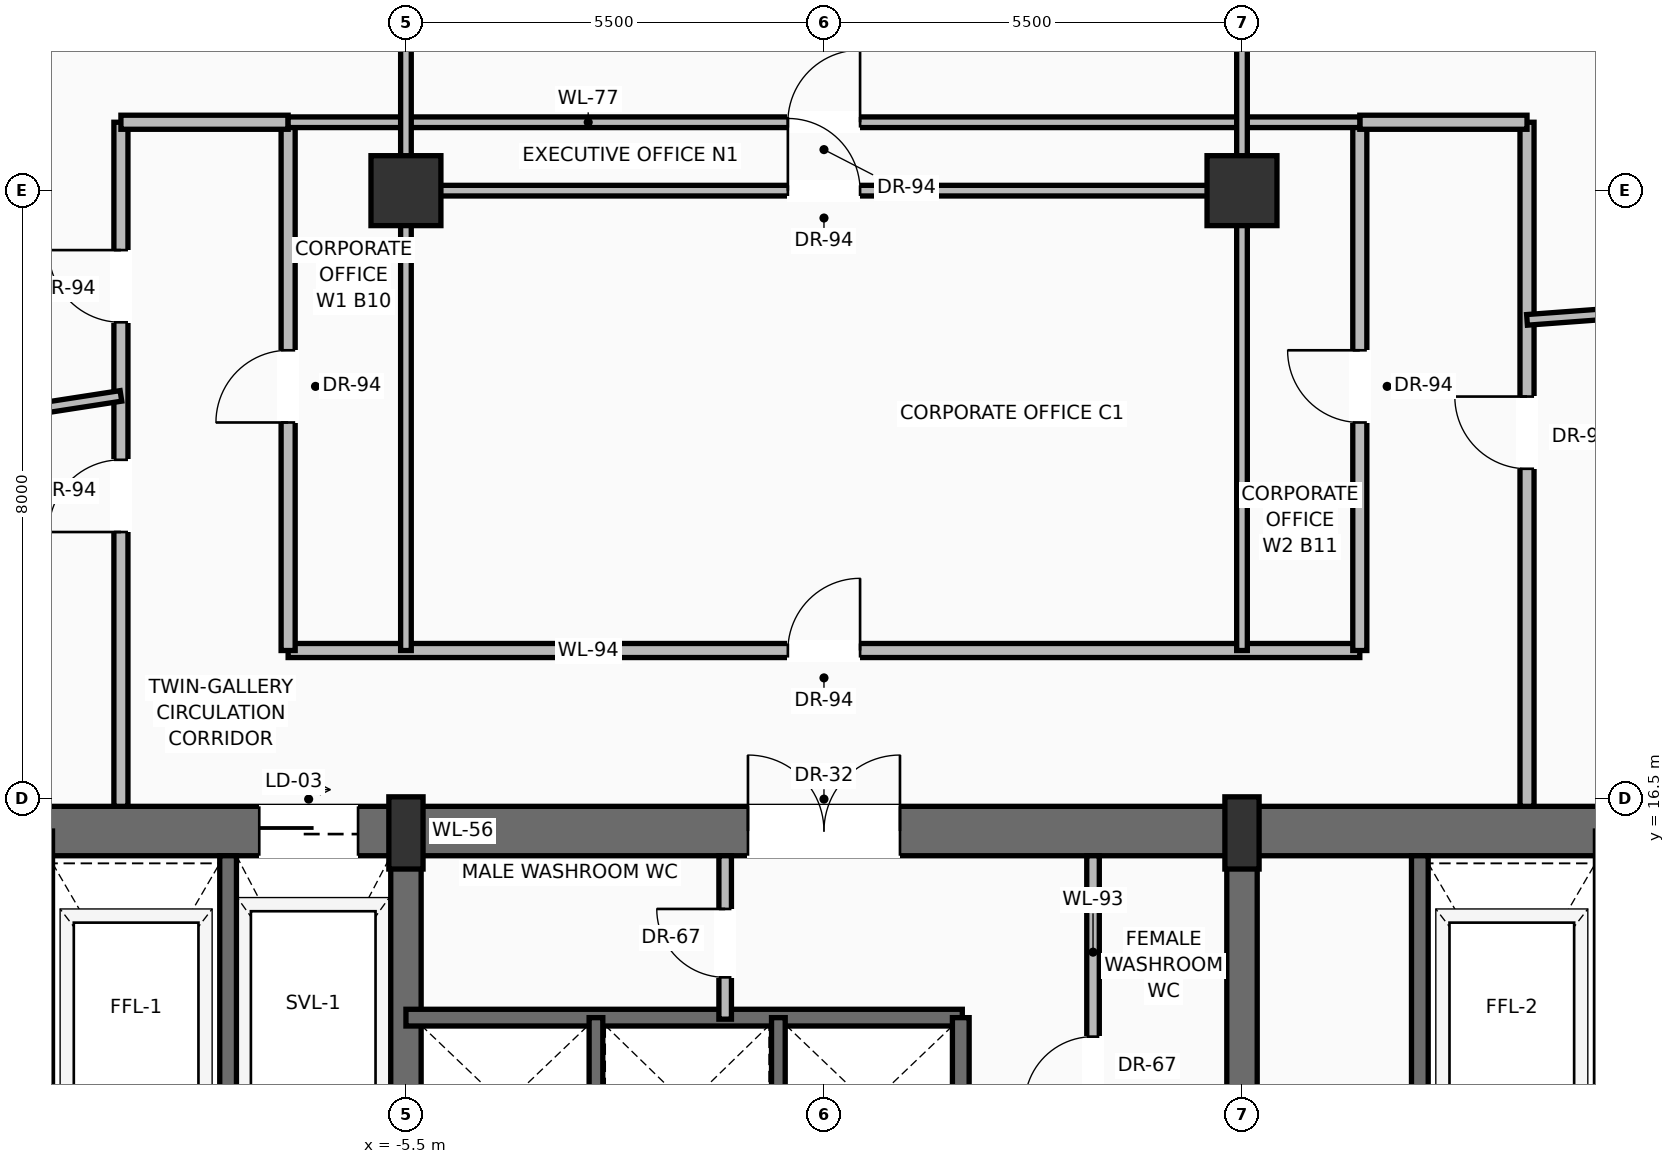
"""IFC4 building model, lengths in metres.
Left out: names, types, materials, properties, quantities, classifications, styles, units other than length and angle.
Written with IfcOpenShell. Run it as: python <this file> out.ifc"""

import sys

from ifc_helpers import new_model, si_unit, direction, frame, frame_2d, origin, origin_2d, place, context, subcontext, project, spatial, rectangle, extrude, source, transform, mapped, element, fill, save


model = new_model("IFC4")
c1 = context("Model", 3, precision=1e-05, world=origin(), true_north=direction((0.0, 1.0)))
c2 = subcontext(c1, "Body", "Model", "MODEL_VIEW")
j1 = project(units=[si_unit("LENGTHUNIT", "METRE"), si_unit("PLANEANGLEUNIT", "RADIAN")], contexts=[c1])
p1 = place(None, origin())
s1 = spatial("IfcSite", under=j1, at=p1, CompositionType="ELEMENT")
p2 = place(p1, origin())
s2 = spatial("IfcBuilding", under=s1, at=p2, CompositionType="ELEMENT")
p3 = place(p2, frame((0.0, 0.0, 129.3)))
s3 = spatial("IfcBuildingStorey", under=s2, at=p3, CompositionType="ELEMENT", Elevation=129.3)
p4 = place(p3, frame((-10.8, 16.075, 0.0), z_axis=(0.0, 0.0, 1.0), x_axis=(1.0, 0.0, 0.0)))
e1 = element("IfcWall", 1, at=p4, inside=s3, PredefinedType="SHEAR", context=c2, shape_type="SweptSolid", body=[
    extrude(rectangle(XDim=21.6, YDim=0.65, at=frame_2d((10.8, 0.0))), origin(), (0.0, 0.0, 1.0), 3.47),
])
p5 = place(p4, frame((3.37, 0.0, 0.0)))
e2 = element("IfcOpeningElement", 2, at=p5, cuts=e1, PredefinedType="OPENING", context=c2, shape_type="SweptSolid", body=[
    extrude(rectangle(XDim=1.3, YDim=2.3, at=frame_2d((0.65, 1.15))), frame((0.0, 0.335, 0.0), z_axis=(0.0, -1.0, 0.0), x_axis=(1.0, 0.0, 0.0)), (0.0, 0.0, 1.0), 0.67),
])
p6 = place(p4, frame((9.8, 0.0, 0.0)))
e3 = element("IfcOpeningElement", 3, at=p6, cuts=e1, PredefinedType="OPENING", context=c2, shape_type="SweptSolid", body=[
    extrude(rectangle(XDim=2.0, YDim=2.4, at=frame_2d((1.0, 1.2))), frame((0.0, 0.335, 0.0), z_axis=(0.0, -1.0, 0.0), x_axis=(1.0, 0.0, 0.0)), (0.0, 0.0, 1.0), 0.67),
])
for number, where, z_axis, x_axis in (
    (4, (-10.475, 0.525, 0.0), (0.0, 0.0, 1.0), (0.0, 1.0, 0.0)),
    (5, (10.475, 0.525, 0.0), (0.0, 0.0, 1.0), (0.0, 1.0, 0.0)),
):
    element("IfcWall", number, at=place(p3, frame(where, z_axis=z_axis, x_axis=x_axis)), inside=s3, PredefinedType="SHEAR", context=c2, shape_type="SweptSolid", body=[
        extrude(rectangle(XDim=15.55, YDim=0.65, at=frame_2d((7.775, 0.0))), origin(), (0.0, 0.0, 1.0), 3.47),
    ])
p7 = place(p3, frame((-5.5, 0.525, 0.0), z_axis=(0.0, 0.0, 1.0), x_axis=(0.0, 1.0, 0.0)))
e6 = element("IfcWall", 6, at=p7, inside=s3, PredefinedType="SHEAR", context=c2, shape_type="SweptSolid", body=[
    extrude(rectangle(XDim=15.55, YDim=0.4, at=frame_2d((7.775, 0.0))), origin(), (0.0, 0.0, 1.0), 3.47),
])
p8 = place(p7, frame((8.975, 0.0, 0.0)))
e7 = element("IfcOpeningElement", 7, at=p8, cuts=e6, PredefinedType="OPENING", context=c2, shape_type="SweptSolid", body=[
    extrude(rectangle(XDim=1.1, YDim=2.2, at=frame_2d((0.55, 1.1))), frame((0.0, 0.21, 0.0), z_axis=(0.0, -1.0, 0.0), x_axis=(1.0, 0.0, 0.0)), (0.0, 0.0, 1.0), 0.42),
])
p9 = place(p3, frame((5.5, 0.525, 0.0), z_axis=(0.0, 0.0, 1.0), x_axis=(0.0, 1.0, 0.0)))
e8 = element("IfcWall", 8, at=p9, inside=s3, PredefinedType="SHEAR", context=c2, shape_type="SweptSolid", body=[
    extrude(rectangle(XDim=15.55, YDim=0.4, at=frame_2d((7.775, 0.0))), origin(), (0.0, 0.0, 1.0), 3.47),
])
p10 = place(p9, frame((8.975, 0.0, 0.0)))
e9 = element("IfcOpeningElement", 9, at=p10, cuts=e8, PredefinedType="OPENING", context=c2, shape_type="SweptSolid", body=[
    extrude(rectangle(XDim=1.1, YDim=2.2, at=frame_2d((0.55, 1.1))), frame((0.0, 0.21, 0.0), z_axis=(0.0, -1.0, 0.0), x_axis=(1.0, 0.0, 0.0)), (0.0, 0.0, 1.0), 0.42),
])
m1 = source(origin(), c2, "Body", "SweptSolid", [
    extrude(rectangle(XDim=0.45, YDim=0.95, at=origin_2d()), origin(), (0.0, 0.0, 1.0), 3.7),
])
for number, where, z_axis, x_axis in (
    (10, (-5.5, 16.05, 0.0), (0.0, 0.0, 1.0), (1.0, 0.0, 0.0)),
    (11, (5.5, 16.05, 0.0), (0.0, 0.0, 1.0), (1.0, 0.0, 0.0)),
):
    element("IfcColumn", number, at=place(p3, frame(where, z_axis=z_axis, x_axis=x_axis)), inside=s3, PredefinedType="PILASTER", context=c2, shape_type="MappedRepresentation", body=[
        mapped(m1, transform((0.0, 0.0, 0.0), scale=1.0)),
    ])
m2 = source(origin(), c2, "Body", "SweptSolid", [
    extrude(rectangle(XDim=0.92, YDim=0.92, at=origin_2d()), origin(), (0.0, 0.0, 1.0), 3.7),
])
for number, where, z_axis, x_axis in (
    (12, (-5.5, 24.5, 0.0), (0.0, 0.0, 1.0), (1.0, 0.0, 0.0)),
    (13, (5.5, 24.5, 0.0), (0.0, 0.0, 1.0), (1.0, 0.0, 0.0)),
):
    element("IfcColumn", number, at=place(p3, frame(where, z_axis=z_axis, x_axis=x_axis)), inside=s3, PredefinedType="COLUMN", context=c2, shape_type="MappedRepresentation", body=[
        mapped(m2, transform((0.0, 0.0, 0.0), scale=1.0)),
    ])
for number, where, z_axis, x_axis in (
    (14, (-7.84, 11.87, 0.0), (0.0, 0.0, 1.0), (0.0, 1.0, 0.0)),
    (15, (7.84, 11.87, 0.0), (0.0, 0.0, 1.0), (0.0, 1.0, 0.0)),
):
    element("IfcWall", number, at=place(p3, frame(where, z_axis=z_axis, x_axis=x_axis)), inside=s3, PredefinedType="SOLIDWALL", context=c2, shape_type="SweptSolid", body=[
        extrude(rectangle(XDim=3.88, YDim=0.22, at=frame_2d((1.94, 0.0))), origin(), (0.0, 0.0, 1.0), 3.47),
    ])
p11 = place(p3, frame((-5.5, 13.62, 0.0), z_axis=(0.0, 0.0, 1.0), x_axis=(1.0, 0.0, 0.0)))
e16 = element("IfcWall", 16, at=p11, inside=s3, PredefinedType="SOLIDWALL", context=c2, shape_type="SweptSolid", body=[
    extrude(rectangle(XDim=7.32, YDim=0.22, at=frame_2d((3.66, 0.0))), origin(), (0.0, 0.0, 1.0), 3.47),
])
p12 = place(p3, frame((1.8, 11.32, 0.0), z_axis=(0.0, 0.0, 1.0), x_axis=(0.0, 1.0, 0.0)))
e17 = element("IfcWall", 17, at=p12, inside=s3, PredefinedType="SOLIDWALL", context=c2, shape_type="SweptSolid", body=[
    extrude(rectangle(XDim=2.3, YDim=0.22, at=frame_2d((1.15, 0.0))), origin(), (0.0, 0.0, 1.0), 3.47),
])
for number, where, z_axis, x_axis in (
    (18, (-3.0, 11.32, 0.0), (0.0, 0.0, 1.0), (0.0, 1.0, 0.0)),
    (19, (-0.6, 11.32, 0.0), (0.0, 0.0, 1.0), (0.0, 1.0, 0.0)),
):
    element("IfcWall", number, at=place(p3, frame(where, z_axis=z_axis, x_axis=x_axis)), inside=s3, PredefinedType="SOLIDWALL", context=c2, shape_type="SweptSolid", body=[
        extrude(rectangle(XDim=2.3, YDim=0.18, at=frame_2d((1.15, 0.0))), origin(), (0.0, 0.0, 1.0), 3.47),
    ])
p13 = place(p3, frame((-1.3, 13.6, 0.0), z_axis=(0.0, 0.0, 1.0), x_axis=(0.0, 1.0, 0.0)))
e20 = element("IfcWall", 20, at=p13, inside=s3, PredefinedType="PARTITIONING", context=c2, shape_type="SweptSolid", body=[
    extrude(rectangle(XDim=2.15, YDim=0.165, at=frame_2d((1.075, 0.0))), origin(), (0.0, 0.0, 1.0), 3.462),
])
p14 = place(p13, frame((0.55, 0.0, 0.0)))
e21 = element("IfcOpeningElement", 21, at=p14, cuts=e20, PredefinedType="OPENING", context=c2, shape_type="SweptSolid", body=[
    extrude(rectangle(XDim=0.9, YDim=2.1, at=frame_2d((0.45, 1.05))), frame((0.0, 0.093, 0.0), z_axis=(0.0, -1.0, 0.0), x_axis=(1.0, 0.0, 0.0)), (0.0, 0.0, 1.0), 0.185),
])
p15 = place(p3, frame((3.54, 11.22, 0.0), z_axis=(0.0, 0.0, 1.0), x_axis=(0.0, 1.0, 0.0)))
e22 = element("IfcWall", 22, at=p15, inside=s3, PredefinedType="PARTITIONING", context=c2, shape_type="SweptSolid", body=[
    extrude(rectangle(XDim=4.53, YDim=0.165, at=frame_2d((2.265, 0.0))), origin(), (0.0, 0.0, 1.0), 3.462),
])
p16 = place(p15, frame((1.25, 0.0, 0.0)))
e23 = element("IfcOpeningElement", 23, at=p16, cuts=e22, PredefinedType="OPENING", context=c2, shape_type="SweptSolid", body=[
    extrude(rectangle(XDim=0.9, YDim=2.1, at=frame_2d((0.45, 1.05))), frame((0.0, 0.093, 0.0), z_axis=(0.0, -1.0, 0.0), x_axis=(1.0, 0.0, 0.0)), (0.0, 0.0, 1.0), 0.185),
])
p17 = place(p3, frame((-7.05, 18.45, 0.0), z_axis=(0.0, 0.0, 1.0), x_axis=(1.0, 0.0, 0.0)))
e24 = element("IfcWall", 24, at=p17, inside=s3, PredefinedType="PARTITIONING", context=c2, shape_type="SweptSolid", body=[
    extrude(rectangle(XDim=14.1, YDim=0.185, at=frame_2d((7.05, 0.0))), origin(), (0.0, 0.0, 1.0), 2.846),
])
p18 = place(p17, frame((6.575, 0.0, 0.0)))
e25 = element("IfcOpeningElement", 25, at=p18, cuts=e24, PredefinedType="OPENING", context=c2, shape_type="SweptSolid", body=[
    extrude(rectangle(XDim=0.95, YDim=2.2, at=frame_2d((0.475, 1.1))), frame((0.0, 0.103, 0.0), z_axis=(0.0, -1.0, 0.0), x_axis=(1.0, 0.0, 0.0)), (0.0, 0.0, 1.0), 0.205),
])
p19 = place(p3, frame((-7.05, 18.45, 0.0), z_axis=(0.0, 0.0, 1.0), x_axis=(0.0, 1.0, 0.0)))
e26 = element("IfcWall", 26, at=p19, inside=s3, PredefinedType="PARTITIONING", context=c2, shape_type="SweptSolid", body=[
    extrude(rectangle(XDim=6.95, YDim=0.185, at=frame_2d((3.475, 0.0))), origin(), (0.0, 0.0, 1.0), 2.846),
])
p20 = place(p19, frame((3.0, 0.0, 0.0)))
e27 = element("IfcOpeningElement", 27, at=p20, cuts=e26, PredefinedType="OPENING", context=c2, shape_type="SweptSolid", body=[
    extrude(rectangle(XDim=0.95, YDim=2.2, at=frame_2d((0.475, 1.1))), frame((0.0, 0.103, 0.0), z_axis=(0.0, -1.0, 0.0), x_axis=(1.0, 0.0, 0.0)), (0.0, 0.0, 1.0), 0.205),
])
p21 = place(p3, frame((7.05, 18.45, 0.0), z_axis=(0.0, 0.0, 1.0), x_axis=(0.0, 1.0, 0.0)))
e28 = element("IfcWall", 28, at=p21, inside=s3, PredefinedType="PARTITIONING", context=c2, shape_type="SweptSolid", body=[
    extrude(rectangle(XDim=6.95, YDim=0.185, at=frame_2d((3.475, 0.0))), origin(), (0.0, 0.0, 1.0), 2.846),
])
p22 = place(p21, frame((3.0, 0.0, 0.0)))
e29 = element("IfcOpeningElement", 29, at=p22, cuts=e28, PredefinedType="OPENING", context=c2, shape_type="SweptSolid", body=[
    extrude(rectangle(XDim=0.95, YDim=2.2, at=frame_2d((0.475, 1.1))), frame((0.0, 0.103, 0.0), z_axis=(0.0, -1.0, 0.0), x_axis=(1.0, 0.0, 0.0)), (0.0, 0.0, 1.0), 0.205),
])
p23 = place(p3, frame((-9.25, 16.4, 0.0), z_axis=(0.0, 0.0, 1.0), x_axis=(0.0, 1.0, 0.0)))
e30 = element("IfcWall", 30, at=p23, inside=s3, PredefinedType="PARTITIONING", context=c2, shape_type="SweptSolid", body=[
    extrude(rectangle(XDim=9.0, YDim=0.185, at=frame_2d((4.5, 0.0))), origin(), (0.0, 0.0, 1.0), 2.846),
])
p24 = place(p23, frame((3.609, 0.0, 0.0)))
e31 = element("IfcOpeningElement", 31, at=p24, cuts=e30, PredefinedType="OPENING", context=c2, shape_type="SweptSolid", body=[
    extrude(rectangle(XDim=0.95, YDim=2.2, at=frame_2d((0.475, 1.1))), frame((0.0, 0.103, 0.0), z_axis=(0.0, -1.0, 0.0), x_axis=(1.0, 0.0, 0.0)), (0.0, 0.0, 1.0), 0.205),
])
p25 = place(p23, frame((6.368, 0.0, 0.0)))
e32 = element("IfcOpeningElement", 32, at=p25, cuts=e30, PredefinedType="OPENING", context=c2, shape_type="SweptSolid", body=[
    extrude(rectangle(XDim=0.95, YDim=2.2, at=frame_2d((0.475, 1.1))), frame((0.0, 0.103, 0.0), z_axis=(0.0, -1.0, 0.0), x_axis=(1.0, 0.0, 0.0)), (0.0, 0.0, 1.0), 0.205),
])
p26 = place(p3, frame((9.25, 16.4, 0.0), z_axis=(0.0, 0.0, 1.0), x_axis=(0.0, 1.0, 0.0)))
e33 = element("IfcWall", 33, at=p26, inside=s3, PredefinedType="PARTITIONING", context=c2, shape_type="SweptSolid", body=[
    extrude(rectangle(XDim=9.0, YDim=0.185, at=frame_2d((4.5, 0.0))), origin(), (0.0, 0.0, 1.0), 2.846),
])
p27 = place(p26, frame((4.441, 0.0, 0.0)))
e34 = element("IfcOpeningElement", 34, at=p27, cuts=e33, PredefinedType="OPENING", context=c2, shape_type="SweptSolid", body=[
    extrude(rectangle(XDim=0.95, YDim=2.2, at=frame_2d((0.475, 1.1))), frame((0.0, 0.103, 0.0), z_axis=(0.0, -1.0, 0.0), x_axis=(1.0, 0.0, 0.0)), (0.0, 0.0, 1.0), 0.205),
])
for number, where, z_axis, x_axis in (
    (35, (-9.25, 25.4, 0.0), (0.0, 0.0, 1.0), (1.0, 0.0, 0.0)),
    (36, (7.05, 25.4, 0.0), (0.0, 0.0, 1.0), (1.0, 0.0, 0.0)),
):
    element("IfcWall", number, at=place(p3, frame(where, z_axis=z_axis, x_axis=x_axis)), inside=s3, PredefinedType="PARTITIONING", context=c2, shape_type="SweptSolid", body=[
        extrude(rectangle(XDim=2.2, YDim=0.185, at=frame_2d((1.1, 0.0))), origin(), (0.0, 0.0, 1.0), 3.462),
    ])
p28 = place(p3, frame((-7.05, 25.4, 0.0), z_axis=(0.0, 0.0, 1.0), x_axis=(1.0, 0.0, 0.0)))
e37 = element("IfcWall", 37, at=p28, inside=s3, PredefinedType="PARTITIONING", context=c2, shape_type="SweptSolid", body=[
    extrude(rectangle(XDim=14.1, YDim=0.14, at=frame_2d((7.05, 0.0))), origin(), (0.0, 0.0, 1.0), 3.462),
])
p29 = place(p28, frame((6.575, 0.0, 0.0)))
e38 = element("IfcOpeningElement", 38, at=p29, cuts=e37, PredefinedType="OPENING", context=c2, shape_type="SweptSolid", body=[
    extrude(rectangle(XDim=0.95, YDim=2.2, at=frame_2d((0.475, 1.1))), frame((0.0, 0.08, 0.0), z_axis=(0.0, -1.0, 0.0), x_axis=(1.0, 0.0, 0.0)), (0.0, 0.0, 1.0), 0.16),
])
for number, where, z_axis, x_axis in (
    (39, (-5.5, 18.45, 0.0), (0.0, 0.0, 1.0), (0.0, 1.0, 0.0)),
    (40, (5.5, 18.45, 0.0), (0.0, 0.0, 1.0), (0.0, 1.0, 0.0)),
):
    element("IfcWall", number, at=place(p3, frame(where, z_axis=z_axis, x_axis=x_axis)), inside=s3, PredefinedType="PARTITIONING", context=c2, shape_type="SweptSolid", body=[
        extrude(rectangle(XDim=14.05, YDim=0.14, at=frame_2d((7.025, 0.0))), origin(), (0.0, 0.0, 1.0), 2.846),
    ])
p30 = place(p3, frame((-5.5, 24.5, 0.0), z_axis=(0.0, 0.0, 1.0), x_axis=(1.0, 0.0, 0.0)))
e41 = element("IfcWall", 41, at=p30, inside=s3, PredefinedType="PARTITIONING", context=c2, shape_type="SweptSolid", body=[
    extrude(rectangle(XDim=11.0, YDim=0.14, at=frame_2d((5.5, 0.0))), origin(), (0.0, 0.0, 1.0), 2.846),
])
p31 = place(p30, frame((5.025, 0.0, 0.0)))
e42 = element("IfcOpeningElement", 42, at=p31, cuts=e41, PredefinedType="OPENING", context=c2, shape_type="SweptSolid", body=[
    extrude(rectangle(XDim=0.95, YDim=2.2, at=frame_2d((0.475, 1.1))), frame((0.0, 0.08, 0.0), z_axis=(0.0, -1.0, 0.0), x_axis=(1.0, 0.0, 0.0)), (0.0, 0.0, 1.0), 0.16),
])
p32 = place(p3, frame((-19.434, 20.223, 0.0), z_axis=(0.0, 0.0, 1.0), x_axis=(0.988220028994, 0.153039780105, 0.0)))
e43 = element("IfcWall", 43, at=p32, inside=s3, PredefinedType="PARTITIONING", context=c2, shape_type="SweptSolid", body=[
    extrude(rectangle(XDim=10.305, YDim=0.14, at=frame_2d((5.153, 0.0))), origin(), (0.0, 0.0, 1.0), 3.462),
])
p33 = place(p3, frame((9.25, 22.8, 0.0), z_axis=(0.0, 0.0, 1.0), x_axis=(0.997273450808, 0.073794744488, 0.0)))
e44 = element("IfcWall", 44, at=p33, inside=s3, PredefinedType="PARTITIONING", context=c2, shape_type="SweptSolid", body=[
    extrude(rectangle(XDim=8.532, YDim=0.14, at=frame_2d((4.266, 0.0))), origin(), (0.0, 0.0, 1.0), 3.462),
])
m3 = source(origin(), c2, "Body", "SweptSolid", [
    extrude(rectangle(XDim=1.3, YDim=2.3, at=frame_2d((0.65, 1.15))), frame((0.0, 0.025, 0.0), z_axis=(0.0, -1.0, 0.0), x_axis=(1.0, 0.0, 0.0)), (0.0, 0.0, 1.0), 0.05),
])
p34 = place(p5, origin())
e45 = element("IfcDoor", 45, at=p34, inside=s3, OperationType="SLIDING_TO_RIGHT", PredefinedType="DOOR", context=c2, shape_type="MappedRepresentation", body=[
    mapped(m3, transform((0.0, 0.0, 0.0), scale=1.0)),
])
fill(e2, e45)
m4 = source(origin(), c2, "Body", "SweptSolid", [
    extrude(rectangle(XDim=2.0, YDim=2.4, at=frame_2d((1.0, 1.2))), frame((0.0, 0.025, 0.0), z_axis=(0.0, -1.0, 0.0), x_axis=(1.0, 0.0, 0.0)), (0.0, 0.0, 1.0), 0.05),
])
p35 = place(p6, origin())
e46 = element("IfcDoor", 46, at=p35, inside=s3, OperationType="DOUBLE_DOOR_SINGLE_SWING", PredefinedType="DOOR", context=c2, shape_type="MappedRepresentation", body=[
    mapped(m4, transform((0.0, 0.0, 0.0), scale=1.0)),
])
fill(e3, e46)
m5 = source(origin(), c2, "Body", "SweptSolid", [
    extrude(rectangle(XDim=0.9, YDim=2.1, at=frame_2d((0.45, 1.05))), frame((0.0, 0.025, 0.0), z_axis=(0.0, -1.0, 0.0), x_axis=(1.0, 0.0, 0.0)), (0.0, 0.0, 1.0), 0.05),
])
p36 = place(p14, origin())
e47 = element("IfcDoor", 47, at=p36, inside=s3, OperationType="SINGLE_SWING_RIGHT", PredefinedType="DOOR", context=c2, shape_type="MappedRepresentation", body=[
    mapped(m5, transform((0.0, 0.0, 0.0), scale=1.0)),
])
fill(e21, e47)
p37 = place(p16, origin())
e48 = element("IfcDoor", 48, at=p37, inside=s3, OperationType="SINGLE_SWING_LEFT", PredefinedType="DOOR", context=c2, shape_type="MappedRepresentation", body=[
    mapped(m5, transform((0.0, 0.0, 0.0), scale=1.0)),
])
fill(e23, e48)
m6 = source(origin(), c2, "Body", "SweptSolid", [
    extrude(rectangle(XDim=0.95, YDim=2.2, at=frame_2d((0.475, 1.1))), frame((0.0, 0.025, 0.0), z_axis=(0.0, -1.0, 0.0), x_axis=(1.0, 0.0, 0.0)), (0.0, 0.0, 1.0), 0.05),
])
p38 = place(p18, origin())
e49 = element("IfcDoor", 49, at=p38, inside=s3, OperationType="SINGLE_SWING_RIGHT", PredefinedType="DOOR", context=c2, shape_type="MappedRepresentation", body=[
    mapped(m6, transform((0.0, 0.0, 0.0), scale=1.0)),
])
fill(e25, e49)
p39 = place(p24, origin())
e50 = element("IfcDoor", 50, at=p39, inside=s3, OperationType="SINGLE_SWING_LEFT", PredefinedType="DOOR", context=c2, shape_type="MappedRepresentation", body=[
    mapped(m6, transform((0.0, 0.0, 0.0), scale=1.0)),
])
fill(e31, e50)
p40 = place(p27, origin())
e51 = element("IfcDoor", 51, at=p40, inside=s3, OperationType="SINGLE_SWING_RIGHT", PredefinedType="DOOR", context=c2, shape_type="MappedRepresentation", body=[
    mapped(m6, transform((0.0, 0.0, 0.0), scale=1.0)),
])
fill(e34, e51)
p41 = place(p20, origin())
e52 = element("IfcDoor", 52, at=p41, inside=s3, OperationType="SINGLE_SWING_LEFT", PredefinedType="DOOR", context=c2, shape_type="MappedRepresentation", body=[
    mapped(m6, transform((0.0, 0.0, 0.0), scale=1.0)),
])
fill(e27, e52)
p42 = place(p22, origin())
e53 = element("IfcDoor", 53, at=p42, inside=s3, OperationType="SINGLE_SWING_RIGHT", PredefinedType="DOOR", context=c2, shape_type="MappedRepresentation", body=[
    mapped(m6, transform((0.0, 0.0, 0.0), scale=1.0)),
])
fill(e29, e53)
p43 = place(p31, origin())
e54 = element("IfcDoor", 54, at=p43, inside=s3, OperationType="SINGLE_SWING_LEFT", PredefinedType="DOOR", context=c2, shape_type="MappedRepresentation", body=[
    mapped(m6, transform((0.0, 0.0, 0.0), scale=1.0)),
])
fill(e42, e54)
p44 = place(p25, origin())
e55 = element("IfcDoor", 55, at=p44, inside=s3, OperationType="SINGLE_SWING_RIGHT", PredefinedType="DOOR", context=c2, shape_type="MappedRepresentation", body=[
    mapped(m6, transform((0.0, 0.0, 0.0), scale=1.0)),
])
fill(e32, e55)
p45 = place(p29, origin())
e56 = element("IfcDoor", 56, at=p45, inside=s3, OperationType="SINGLE_SWING_RIGHT", PredefinedType="DOOR", context=c2, shape_type="MappedRepresentation", body=[
    mapped(m6, transform((0.0, 0.0, 0.0), scale=1.0)),
])
fill(e38, e56)
save(model, sys.argv[1])
